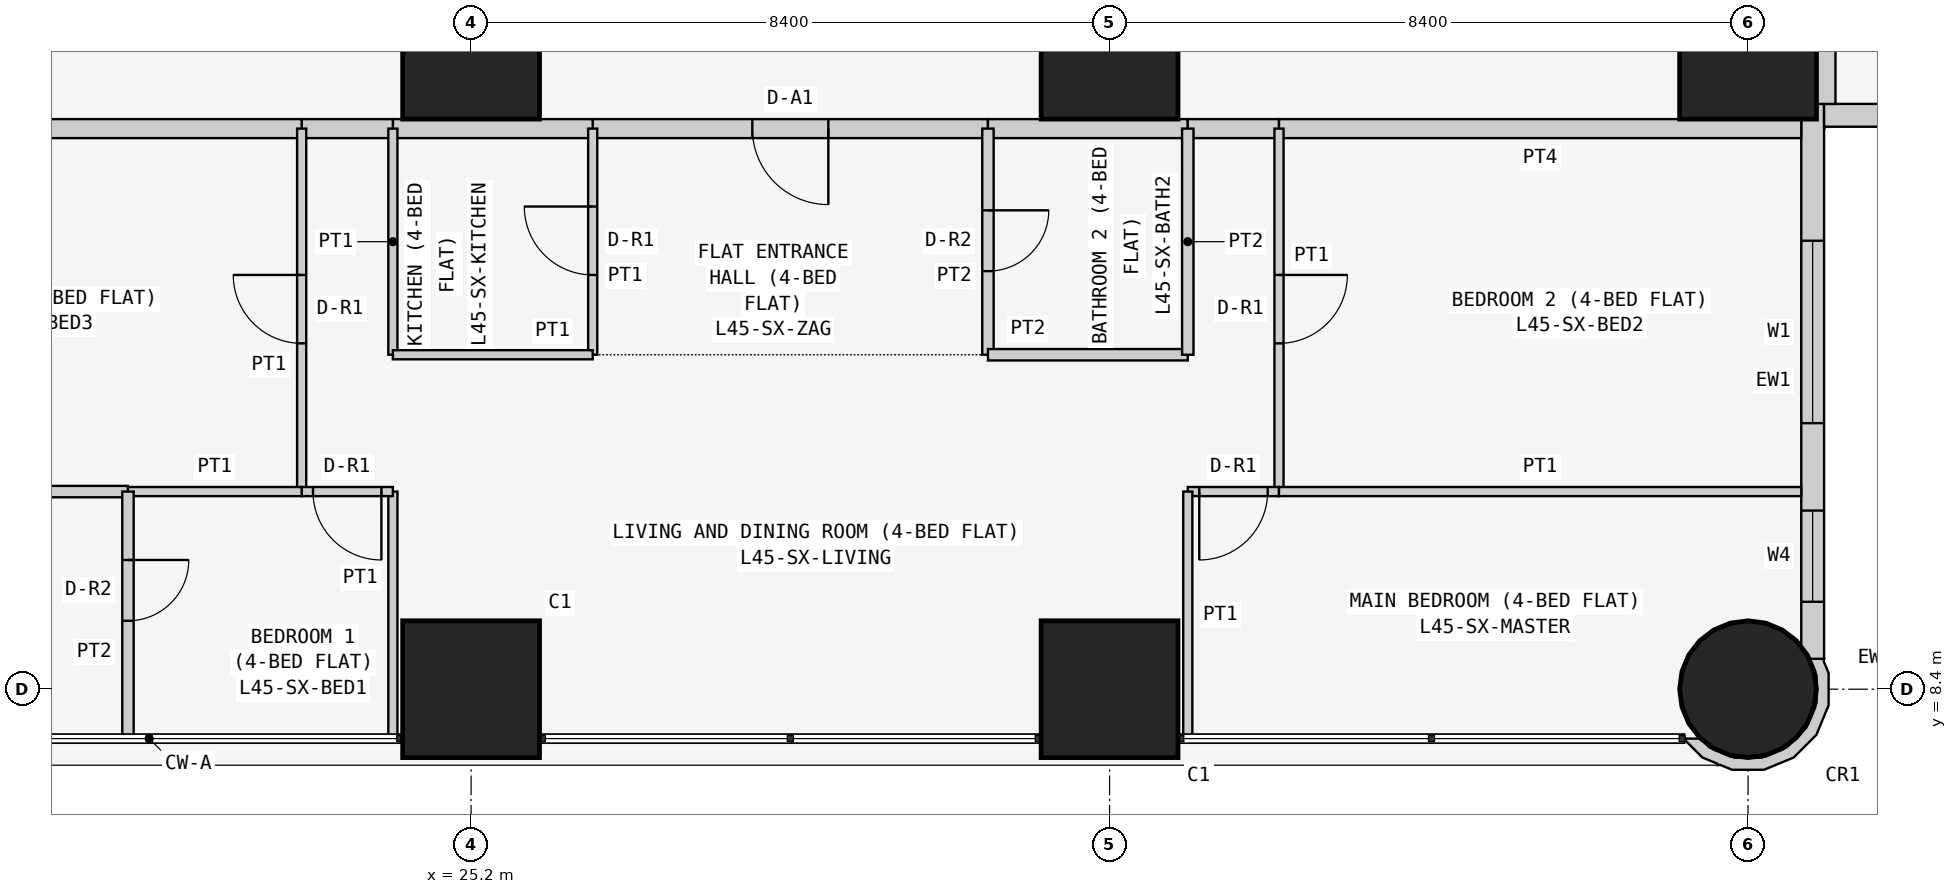
"""IFC4 building model, lengths in metres.
Left out: names, types, materials, properties, quantities, classifications, styles, units other than length and angle.
Written with IfcOpenShell. Run it as: python <this file> out.ifc"""

import sys

from ifc_helpers import new_model, si_unit, direction, frame, frame_2d, origin, origin_2d, place, context, subcontext, project, spatial, polyline, rectangle, circle, outline, extrude, element, fill, save


model = new_model("IFC4")
c1 = context("Model", 3, precision=1e-05, world=origin(), true_north=direction((0.0, 1.0)))
c2 = subcontext(c1, "Body", "Model", "MODEL_VIEW")
j1 = project(units=[si_unit("LENGTHUNIT", "METRE"), si_unit("PLANEANGLEUNIT", "RADIAN")], contexts=[c1])
p1 = place(None, origin())
s1 = spatial("IfcSite", under=j1, at=p1, CompositionType="ELEMENT")
p2 = place(p1, origin())
s2 = spatial("IfcBuilding", under=s1, at=p2, CompositionType="ELEMENT")
p3 = place(p2, frame((0.0, 0.0, 173.7)))
s3 = spatial("IfcBuildingStorey", under=s2, at=p3, CompositionType="ELEMENT", Elevation=173.7)
for number, where, z_axis, x_axis in (
    (1, (25.2, 8.4, 0.0), (0.0, 0.0, 1.0), (1.0, 0.0, 0.0)),
    (2, (25.2, 16.8, 0.0), (0.0, 0.0, 1.0), (1.0, 0.0, 0.0)),
    (3, (33.6, 8.4, 0.0), (0.0, 0.0, 1.0), (1.0, 0.0, 0.0)),
    (4, (33.6, 16.8, 0.0), (0.0, 0.0, 1.0), (1.0, 0.0, 0.0)),
):
    element("IfcColumn", number, at=place(p3, frame(where, z_axis=z_axis, x_axis=x_axis)), inside=s3, PredefinedType="COLUMN", context=c2, shape_type="SweptSolid", body=[
        extrude(rectangle(XDim=1.8, YDim=1.8, at=origin_2d()), origin(), (0.0, 0.0, 1.0), 3.6),
    ])
p4 = place(p3, frame((42.0, 8.4, 0.0), z_axis=(0.0, 0.0, 1.0), x_axis=(1.0, 0.0, 0.0)))
e5 = element("IfcColumn", 5, at=p4, inside=s3, PredefinedType="COLUMN", context=c2, shape_type="SweptSolid", body=[
    extrude(circle(Radius=0.9, at=origin_2d()), origin(), (0.0, 0.0, 1.0), 3.6),
])
p5 = place(p3, frame((42.0, 16.8, 0.0), z_axis=(0.0, 0.0, 1.0), x_axis=(1.0, 0.0, 0.0)))
e6 = element("IfcColumn", 6, at=p5, inside=s3, PredefinedType="COLUMN", context=c2, shape_type="SweptSolid", body=[
    extrude(rectangle(XDim=1.8, YDim=1.8, at=origin_2d()), origin(), (0.0, 0.0, 1.0), 3.6),
])
p6 = place(p3, frame((42.85, 8.8, 0.0), z_axis=(0.0, 0.0, 1.0), x_axis=(0.0, 1.0, 0.0)))
e7 = element("IfcWall", 7, at=p6, inside=s3, PredefinedType="SOLIDWALL", context=c2, shape_type="SweptSolid", body=[
    extrude(rectangle(XDim=7.3, YDim=0.3, at=frame_2d((3.65, 0.0))), origin(), (0.0, 0.0, 1.0), 3.35),
])
p7 = place(p6, frame((3.1, 0.0, 0.9)))
e8 = element("IfcOpeningElement", 8, at=p7, cuts=e7, PredefinedType="OPENING", context=c2, shape_type="SweptSolid", body=[
    extrude(rectangle(XDim=2.4, YDim=1.5, at=frame_2d((1.2, 0.75))), frame((0.0, 0.16, 0.0), z_axis=(0.0, -1.0, 0.0), x_axis=(1.0, 0.0, 0.0)), (0.0, 0.0, 1.0), 0.32),
])
p8 = place(p6, frame((0.75, 0.0, 0.9)))
e9 = element("IfcOpeningElement", 9, at=p8, cuts=e7, PredefinedType="OPENING", context=c2, shape_type="SweptSolid", body=[
    extrude(rectangle(XDim=1.2, YDim=1.5, at=frame_2d((0.6, 0.75))), frame((0.0, 0.16, 0.0), z_axis=(0.0, -1.0, 0.0), x_axis=(1.0, 0.0, 0.0)), (0.0, 0.0, 1.0), 0.32),
])
p9 = place(p3, frame((43.0, 15.95, 0.0), z_axis=(0.0, 0.0, 1.0), x_axis=(1.0, 0.0, 0.0)))
e10 = element("IfcWall", 10, at=p9, inside=s3, PredefinedType="SOLIDWALL", context=c2, shape_type="SweptSolid", body=[
    extrude(rectangle(XDim=15.4, YDim=0.3, at=frame_2d((7.7, 0.0))), origin(), (0.0, 0.0, 1.0), 3.35),
])
p10 = place(p9, frame((1.2, 0.0, 0.9)))
e11 = element("IfcOpeningElement", 11, at=p10, cuts=e10, PredefinedType="OPENING", context=c2, shape_type="SweptSolid", body=[
    extrude(rectangle(XDim=1.8, YDim=1.5, at=frame_2d((0.9, 0.75))), frame((0.0, 0.16, 0.0), z_axis=(0.0, -1.0, 0.0), x_axis=(1.0, 0.0, 0.0)), (0.0, 0.0, 1.0), 0.32),
])
p11 = place(p9, frame((4.95, 0.0, 1.5)))
e12 = element("IfcOpeningElement", 12, at=p11, cuts=e10, PredefinedType="OPENING", context=c2, shape_type="SweptSolid", body=[
    extrude(rectangle(XDim=0.9, YDim=0.7, at=frame_2d((0.45, 0.35))), frame((0.0, 0.16, 0.0), z_axis=(0.0, -1.0, 0.0), x_axis=(1.0, 0.0, 0.0)), (0.0, 0.0, 1.0), 0.32),
])
p12 = place(p9, frame((8.5, 0.0, 0.9)))
e13 = element("IfcOpeningElement", 13, at=p12, cuts=e10, PredefinedType="OPENING", context=c2, shape_type="SweptSolid", body=[
    extrude(rectangle(XDim=1.8, YDim=1.5, at=frame_2d((0.9, 0.75))), frame((0.0, 0.16, 0.0), z_axis=(0.0, -1.0, 0.0), x_axis=(1.0, 0.0, 0.0)), (0.0, 0.0, 1.0), 0.32),
])
p13 = place(p9, frame((12.5, 0.0, 0.0)))
e14 = element("IfcOpeningElement", 14, at=p13, cuts=e10, PredefinedType="OPENING", context=c2, shape_type="SweptSolid", body=[
    extrude(rectangle(XDim=0.9, YDim=2.4, at=frame_2d((0.45, 1.2))), frame((0.0, 0.16, 0.0), z_axis=(0.0, -1.0, 0.0), x_axis=(1.0, 0.0, 0.0)), (0.0, 0.0, 1.0), 0.32),
])
p14 = place(p9, frame((13.5, 0.0, 0.9)))
e15 = element("IfcOpeningElement", 15, at=p14, cuts=e10, PredefinedType="OPENING", context=c2, shape_type="SweptSolid", body=[
    extrude(rectangle(XDim=1.2, YDim=1.5, at=frame_2d((0.6, 0.75))), frame((0.0, 0.16, 0.0), z_axis=(0.0, -1.0, 0.0), x_axis=(1.0, 0.0, 0.0)), (0.0, 0.0, 1.0), 0.32),
])
p15 = place(p3, frame((41.233, 7.789, 0.0), z_axis=(0.0, 0.0, 1.0), x_axis=(0.377204953059, -0.926129809145, 0.0)))
e16 = element("IfcWall", 16, at=p15, inside=s3, PredefinedType="SOLIDWALL", context=c2, shape_type="SweptSolid", body=[
    extrude(outline(polyline([(0.319, 1.842), (-0.072, 2.002), (-0.24, 2.001), (-0.27, 2.017), (-0.37, 1.841), (-0.102, 1.842), (0.23, 1.707), (0.485, 1.455), (0.624, 1.125), (0.626, 0.766), (0.491, 0.434), (0.239, 0.179), (0.09, 0.117), (0.011, -0.078), (0.025, -0.083), (0.329, 0.045), (0.48, 0.198), (0.499, 0.193), (0.508, 0.225), (0.626, 0.345), (0.785, 0.736), (0.782, 1.157), (0.619, 1.546), (0.319, 1.842)])), origin(), (0.0, 0.0, 1.0), 3.35),
])
p16 = place(p3, frame((43.025, 22.571, 0.0), z_axis=(0.0, 0.0, 1.0), x_axis=(0.0, -1.0, 0.0)))
e17 = element("IfcWall", 17, at=p16, inside=s3, PredefinedType="PARTITIONING", context=c2, shape_type="SweptSolid", body=[
    extrude(rectangle(XDim=6.471, YDim=0.25, at=frame_2d((3.235, 0.0))), origin(), (0.0, 0.0, 1.0), 3.35),
])
p17 = place(p3, frame((32.0, 15.775, 0.0), z_axis=(0.0, 0.0, 1.0), x_axis=(-1.0, 0.0, 0.0)))
e18 = element("IfcWall", 18, at=p17, inside=s3, PredefinedType="PARTITIONING", context=c2, shape_type="SweptSolid", body=[
    extrude(rectangle(XDim=5.2, YDim=0.25, at=frame_2d((2.6, 0.0))), origin(), (0.0, 0.0, 1.0), 3.35),
])
p18 = place(p17, frame((2.1, 0.0, 0.0)))
e19 = element("IfcOpeningElement", 19, at=p18, cuts=e18, PredefinedType="OPENING", context=c2, shape_type="SweptSolid", body=[
    extrude(rectangle(XDim=1.0, YDim=2.1, at=frame_2d((0.5, 1.05))), frame((0.0, 0.135, 0.0), z_axis=(0.0, -1.0, 0.0), x_axis=(1.0, 0.0, 0.0)), (0.0, 0.0, 1.0), 0.27),
])
p19 = place(p3, frame((34.629, 15.775, 0.0), z_axis=(0.0, 0.0, 1.0), x_axis=(-1.0, 0.0, 0.0)))
e20 = element("IfcWall", 20, at=p19, inside=s3, PredefinedType="PARTITIONING", context=c2, shape_type="SweptSolid", body=[
    extrude(rectangle(XDim=2.629, YDim=0.25, at=frame_2d((1.314, 0.0))), origin(), (0.0, 0.0, 1.0), 3.35),
])
p20 = place(p3, frame((26.8, 15.775, 0.0), z_axis=(0.0, 0.0, 1.0), x_axis=(-1.0, 0.0, 0.0)))
e21 = element("IfcWall", 21, at=p20, inside=s3, PredefinedType="PARTITIONING", context=c2, shape_type="SweptSolid", body=[
    extrude(rectangle(XDim=2.629, YDim=0.25, at=frame_2d((1.314, 0.0))), origin(), (0.0, 0.0, 1.0), 3.35),
])
p21 = place(p3, frame((24.171, 15.775, 0.0), z_axis=(0.0, 0.0, 1.0), x_axis=(-1.0, 0.0, 0.0)))
e22 = element("IfcWall", 22, at=p21, inside=s3, PredefinedType="PARTITIONING", context=c2, shape_type="SweptSolid", body=[
    extrude(rectangle(XDim=1.2, YDim=0.25, at=frame_2d((0.6, 0.0))), origin(), (0.0, 0.0, 1.0), 3.35),
])
p22 = place(p3, frame((35.829, 15.775, 0.0), z_axis=(0.0, 0.0, 1.0), x_axis=(-1.0, 0.0, 0.0)))
e23 = element("IfcWall", 23, at=p22, inside=s3, PredefinedType="PARTITIONING", context=c2, shape_type="SweptSolid", body=[
    extrude(rectangle(XDim=1.2, YDim=0.25, at=frame_2d((0.6, 0.0))), origin(), (0.0, 0.0, 1.0), 3.35),
])
for number, where, z_axis, x_axis in (
    (24, (42.7, 15.775, 0.0), (0.0, 0.0, 1.0), (-1.0, 0.0, 0.0)),
    (25, (22.971, 15.775, 0.0), (0.0, 0.0, 1.0), (-1.0, 0.0, 0.0)),
):
    element("IfcWall", number, at=place(p3, frame(where, z_axis=z_axis, x_axis=x_axis)), inside=s3, PredefinedType="PARTITIONING", context=c2, shape_type="SweptSolid", body=[
        extrude(rectangle(XDim=6.871, YDim=0.25, at=frame_2d((3.436, 0.0))), origin(), (0.0, 0.0, 1.0), 3.35),
    ])
p23 = place(p3, frame((32.0, 12.8, 0.0), z_axis=(0.0, 0.0, 1.0), x_axis=(0.0, 1.0, 0.0)))
e26 = element("IfcWall", 26, at=p23, inside=s3, PredefinedType="PARTITIONING", context=c2, shape_type="SweptSolid", body=[
    extrude(rectangle(XDim=2.975, YDim=0.15, at=frame_2d((1.487, 0.0))), origin(), (0.0, 0.0, 1.0), 3.35),
])
p24 = place(p23, frame((1.1, 0.0, 0.0)))
e27 = element("IfcOpeningElement", 27, at=p24, cuts=e26, PredefinedType="OPENING", context=c2, shape_type="SweptSolid", body=[
    extrude(rectangle(XDim=0.8, YDim=2.1, at=frame_2d((0.4, 1.05))), frame((0.0, 0.085, 0.0), z_axis=(0.0, -1.0, 0.0), x_axis=(1.0, 0.0, 0.0)), (0.0, 0.0, 1.0), 0.17),
])
p25 = place(p3, frame((26.8, 15.775, 0.0), z_axis=(0.0, 0.0, 1.0), x_axis=(0.0, -1.0, 0.0)))
e28 = element("IfcWall", 28, at=p25, inside=s3, PredefinedType="PARTITIONING", context=c2, shape_type="SweptSolid", body=[
    extrude(rectangle(XDim=2.975, YDim=0.12, at=frame_2d((1.487, 0.0))), origin(), (0.0, 0.0, 1.0), 3.35),
])
p26 = place(p25, frame((1.025, 0.0, 0.0)))
e29 = element("IfcOpeningElement", 29, at=p26, cuts=e28, PredefinedType="OPENING", context=c2, shape_type="SweptSolid", body=[
    extrude(rectangle(XDim=0.9, YDim=2.1, at=frame_2d((0.45, 1.05))), frame((0.0, 0.07, 0.0), z_axis=(0.0, -1.0, 0.0), x_axis=(1.0, 0.0, 0.0)), (0.0, 0.0, 1.0), 0.14),
])
p27 = place(p3, frame((32.0, 12.8, 0.0), z_axis=(0.0, 0.0, 1.0), x_axis=(1.0, 0.0, 0.0)))
e30 = element("IfcWall", 30, at=p27, inside=s3, PredefinedType="PARTITIONING", context=c2, shape_type="SweptSolid", body=[
    extrude(rectangle(XDim=2.629, YDim=0.15, at=frame_2d((1.314, 0.0))), origin(), (0.0, 0.0, 1.0), 3.35),
])
p28 = place(p3, frame((34.629, 12.8, 0.0), z_axis=(0.0, 0.0, 1.0), x_axis=(0.0, 1.0, 0.0)))
e31 = element("IfcWall", 31, at=p28, inside=s3, PredefinedType="PARTITIONING", context=c2, shape_type="SweptSolid", body=[
    extrude(rectangle(XDim=2.975, YDim=0.15, at=frame_2d((1.487, 0.0))), origin(), (0.0, 0.0, 1.0), 3.35),
])
p29 = place(p3, frame((24.171, 15.775, 0.0), z_axis=(0.0, 0.0, 1.0), x_axis=(0.0, -1.0, 0.0)))
e32 = element("IfcWall", 32, at=p29, inside=s3, PredefinedType="PARTITIONING", context=c2, shape_type="SweptSolid", body=[
    extrude(rectangle(XDim=2.975, YDim=0.12, at=frame_2d((1.487, 0.0))), origin(), (0.0, 0.0, 1.0), 3.35),
])
p30 = place(p3, frame((24.171, 12.8, 0.0), z_axis=(0.0, 0.0, 1.0), x_axis=(1.0, 0.0, 0.0)))
e33 = element("IfcWall", 33, at=p30, inside=s3, PredefinedType="PARTITIONING", context=c2, shape_type="SweptSolid", body=[
    extrude(rectangle(XDim=2.629, YDim=0.12, at=frame_2d((1.314, 0.0))), origin(), (0.0, 0.0, 1.0), 3.35),
])
p31 = place(p3, frame((35.829, 15.775, 0.0), z_axis=(0.0, 0.0, 1.0), x_axis=(0.0, -1.0, 0.0)))
e34 = element("IfcWall", 34, at=p31, inside=s3, PredefinedType="PARTITIONING", context=c2, shape_type="SweptSolid", body=[
    extrude(rectangle(XDim=4.775, YDim=0.12, at=frame_2d((2.387, 0.0))), origin(), (0.0, 0.0, 1.0), 3.35),
])
p32 = place(p31, frame((1.925, 0.0, 0.0)))
e35 = element("IfcOpeningElement", 35, at=p32, cuts=e34, PredefinedType="OPENING", context=c2, shape_type="SweptSolid", body=[
    extrude(rectangle(XDim=0.9, YDim=2.1, at=frame_2d((0.45, 1.05))), frame((0.0, 0.07, 0.0), z_axis=(0.0, -1.0, 0.0), x_axis=(1.0, 0.0, 0.0)), (0.0, 0.0, 1.0), 0.14),
])
p33 = place(p3, frame((35.829, 11.0, 0.0), z_axis=(0.0, 0.0, 1.0), x_axis=(-1.0, 0.0, 0.0)))
e36 = element("IfcWall", 36, at=p33, inside=s3, PredefinedType="PARTITIONING", context=c2, shape_type="SweptSolid", body=[
    extrude(rectangle(XDim=1.2, YDim=0.12, at=frame_2d((0.6, 0.0))), origin(), (0.0, 0.0, 1.0), 3.35),
])
p34 = place(p33, frame((0.149, 0.0, 0.0)))
e37 = element("IfcOpeningElement", 37, at=p34, cuts=e36, PredefinedType="OPENING", context=c2, shape_type="SweptSolid", body=[
    extrude(rectangle(XDim=0.9, YDim=2.1, at=frame_2d((0.45, 1.05))), frame((0.0, 0.07, 0.0), z_axis=(0.0, -1.0, 0.0), x_axis=(1.0, 0.0, 0.0)), (0.0, 0.0, 1.0), 0.14),
])
p35 = place(p3, frame((34.629, 11.0, 0.0), z_axis=(0.0, 0.0, 1.0), x_axis=(0.0, -1.0, 0.0)))
e38 = element("IfcWall", 38, at=p35, inside=s3, PredefinedType="PARTITIONING", context=c2, shape_type="SweptSolid", body=[
    extrude(rectangle(XDim=3.25, YDim=0.12, at=frame_2d((1.625, 0.0))), origin(), (0.0, 0.0, 1.0), 3.35),
])
p36 = place(p3, frame((22.971, 11.0, 0.0), z_axis=(0.0, 0.0, 1.0), x_axis=(0.0, 1.0, 0.0)))
e39 = element("IfcWall", 39, at=p36, inside=s3, PredefinedType="PARTITIONING", context=c2, shape_type="SweptSolid", body=[
    extrude(rectangle(XDim=4.775, YDim=0.12, at=frame_2d((2.387, 0.0))), origin(), (0.0, 0.0, 1.0), 3.35),
])
p37 = place(p36, frame((1.95, 0.0, 0.0)))
e40 = element("IfcOpeningElement", 40, at=p37, cuts=e39, PredefinedType="OPENING", context=c2, shape_type="SweptSolid", body=[
    extrude(rectangle(XDim=0.9, YDim=2.1, at=frame_2d((0.45, 1.05))), frame((0.0, 0.07, 0.0), z_axis=(0.0, -1.0, 0.0), x_axis=(1.0, 0.0, 0.0)), (0.0, 0.0, 1.0), 0.14),
])
p38 = place(p3, frame((24.171, 7.75, 0.0), z_axis=(0.0, 0.0, 1.0), x_axis=(0.0, 1.0, 0.0)))
e41 = element("IfcWall", 41, at=p38, inside=s3, PredefinedType="PARTITIONING", context=c2, shape_type="SweptSolid", body=[
    extrude(rectangle(XDim=3.25, YDim=0.12, at=frame_2d((1.625, 0.0))), origin(), (0.0, 0.0, 1.0), 3.35),
])
p39 = place(p3, frame((24.171, 11.0, 0.0), z_axis=(0.0, 0.0, 1.0), x_axis=(-1.0, 0.0, 0.0)))
e42 = element("IfcWall", 42, at=p39, inside=s3, PredefinedType="PARTITIONING", context=c2, shape_type="SweptSolid", body=[
    extrude(rectangle(XDim=1.2, YDim=0.12, at=frame_2d((0.6, 0.0))), origin(), (0.0, 0.0, 1.0), 3.35),
])
p40 = place(p39, frame((0.151, 0.0, 0.0)))
e43 = element("IfcOpeningElement", 43, at=p40, cuts=e42, PredefinedType="OPENING", context=c2, shape_type="SweptSolid", body=[
    extrude(rectangle(XDim=0.9, YDim=2.1, at=frame_2d((0.45, 1.05))), frame((0.0, 0.07, 0.0), z_axis=(0.0, -1.0, 0.0), x_axis=(1.0, 0.0, 0.0)), (0.0, 0.0, 1.0), 0.14),
])
p41 = place(p3, frame((35.829, 11.0, 0.0), z_axis=(0.0, 0.0, 1.0), x_axis=(1.0, 0.0, 0.0)))
e44 = element("IfcWall", 44, at=p41, inside=s3, PredefinedType="PARTITIONING", context=c2, shape_type="SweptSolid", body=[
    extrude(rectangle(XDim=6.871, YDim=0.12, at=frame_2d((3.436, 0.0))), origin(), (0.0, 0.0, 1.0), 3.35),
])
p42 = place(p3, frame((16.1, 11.0, 0.0), z_axis=(0.0, 0.0, 1.0), x_axis=(1.0, 0.0, 0.0)))
e45 = element("IfcWall", 45, at=p42, inside=s3, PredefinedType="PARTITIONING", context=c2, shape_type="SweptSolid", body=[
    extrude(rectangle(XDim=4.586, YDim=0.15, at=frame_2d((2.293, 0.0))), origin(), (0.0, 0.0, 1.0), 3.35),
])
p43 = place(p3, frame((20.686, 11.0, 0.0), z_axis=(0.0, 0.0, 1.0), x_axis=(1.0, 0.0, 0.0)))
e46 = element("IfcWall", 46, at=p43, inside=s3, PredefinedType="PARTITIONING", context=c2, shape_type="SweptSolid", body=[
    extrude(rectangle(XDim=2.285, YDim=0.12, at=frame_2d((1.143, 0.0))), origin(), (0.0, 0.0, 1.0), 3.35),
])
p44 = place(p3, frame((20.686, 7.75, 0.0), z_axis=(0.0, 0.0, 1.0), x_axis=(0.0, 1.0, 0.0)))
e47 = element("IfcWall", 47, at=p44, inside=s3, PredefinedType="PARTITIONING", context=c2, shape_type="SweptSolid", body=[
    extrude(rectangle(XDim=3.25, YDim=0.15, at=frame_2d((1.625, 0.0))), origin(), (0.0, 0.0, 1.0), 3.35),
])
p45 = place(p44, frame((1.55, 0.0, 0.0)))
e48 = element("IfcOpeningElement", 48, at=p45, cuts=e47, PredefinedType="OPENING", context=c2, shape_type="SweptSolid", body=[
    extrude(rectangle(XDim=0.8, YDim=2.1, at=frame_2d((0.4, 1.05))), frame((0.0, 0.085, 0.0), z_axis=(0.0, -1.0, 0.0), x_axis=(1.0, 0.0, 0.0)), (0.0, 0.0, 1.0), 0.17),
])
p46 = place(p7, origin())
e49 = element("IfcWindow", 49, at=p46, inside=s3, PartitioningType="SINGLE_PANEL", PredefinedType="WINDOW", context=c2, shape_type="SweptSolid", body=[
    extrude(rectangle(XDim=2.4, YDim=1.5, at=frame_2d((1.2, 0.75))), frame((0.0, 0.03, 0.0), z_axis=(0.0, -1.0, 0.0), x_axis=(1.0, 0.0, 0.0)), (0.0, 0.0, 1.0), 0.06),
])
fill(e8, e49)
p47 = place(p8, origin())
e50 = element("IfcWindow", 50, at=p47, inside=s3, PartitioningType="SINGLE_PANEL", PredefinedType="WINDOW", context=c2, shape_type="SweptSolid", body=[
    extrude(rectangle(XDim=1.2, YDim=1.5, at=frame_2d((0.6, 0.75))), frame((0.0, 0.03, 0.0), z_axis=(0.0, -1.0, 0.0), x_axis=(1.0, 0.0, 0.0)), (0.0, 0.0, 1.0), 0.06),
])
fill(e9, e50)
p48 = place(p18, origin())
e51 = element("IfcDoor", 51, at=p48, inside=s3, OperationType="SINGLE_SWING_LEFT", PredefinedType="DOOR", context=c2, shape_type="SweptSolid", body=[
    extrude(rectangle(XDim=1.0, YDim=2.1, at=frame_2d((0.5, 1.05))), frame((0.0, 0.025, 0.0), z_axis=(0.0, -1.0, 0.0), x_axis=(1.0, 0.0, 0.0)), (0.0, 0.0, 1.0), 0.05),
])
fill(e19, e51)
p49 = place(p24, frame((0.8, 0.0, 0.0), z_axis=(0.0, 0.0, 1.0), x_axis=(-1.0, 0.0, 0.0)))
e52 = element("IfcDoor", 52, at=p49, inside=s3, OperationType="SINGLE_SWING_LEFT", PredefinedType="DOOR", context=c2, shape_type="SweptSolid", body=[
    extrude(rectangle(XDim=0.8, YDim=2.1, at=frame_2d((0.4, 1.05))), frame((0.0, 0.025, 0.0), z_axis=(0.0, -1.0, 0.0), x_axis=(1.0, 0.0, 0.0)), (0.0, 0.0, 1.0), 0.05),
])
fill(e27, e52)
p50 = place(p26, frame((0.9, 0.0, 0.0), z_axis=(0.0, 0.0, 1.0), x_axis=(-1.0, 0.0, 0.0)))
e53 = element("IfcDoor", 53, at=p50, inside=s3, OperationType="SINGLE_SWING_RIGHT", PredefinedType="DOOR", context=c2, shape_type="SweptSolid", body=[
    extrude(rectangle(XDim=0.9, YDim=2.1, at=frame_2d((0.45, 1.05))), frame((0.0, 0.025, 0.0), z_axis=(0.0, -1.0, 0.0), x_axis=(1.0, 0.0, 0.0)), (0.0, 0.0, 1.0), 0.05),
])
fill(e29, e53)
p51 = place(p32, origin())
e54 = element("IfcDoor", 54, at=p51, inside=s3, OperationType="SINGLE_SWING_LEFT", PredefinedType="DOOR", context=c2, shape_type="SweptSolid", body=[
    extrude(rectangle(XDim=0.9, YDim=2.1, at=frame_2d((0.45, 1.05))), frame((0.0, 0.025, 0.0), z_axis=(0.0, -1.0, 0.0), x_axis=(1.0, 0.0, 0.0)), (0.0, 0.0, 1.0), 0.05),
])
fill(e35, e54)
p52 = place(p34, origin())
e55 = element("IfcDoor", 55, at=p52, inside=s3, OperationType="SINGLE_SWING_RIGHT", PredefinedType="DOOR", context=c2, shape_type="SweptSolid", body=[
    extrude(rectangle(XDim=0.9, YDim=2.1, at=frame_2d((0.45, 1.05))), frame((0.0, 0.025, 0.0), z_axis=(0.0, -1.0, 0.0), x_axis=(1.0, 0.0, 0.0)), (0.0, 0.0, 1.0), 0.05),
])
fill(e37, e55)
p53 = place(p37, origin())
e56 = element("IfcDoor", 56, at=p53, inside=s3, OperationType="SINGLE_SWING_RIGHT", PredefinedType="DOOR", context=c2, shape_type="SweptSolid", body=[
    extrude(rectangle(XDim=0.9, YDim=2.1, at=frame_2d((0.45, 1.05))), frame((0.0, 0.025, 0.0), z_axis=(0.0, -1.0, 0.0), x_axis=(1.0, 0.0, 0.0)), (0.0, 0.0, 1.0), 0.05),
])
fill(e40, e56)
p54 = place(p40, origin())
e57 = element("IfcDoor", 57, at=p54, inside=s3, OperationType="SINGLE_SWING_LEFT", PredefinedType="DOOR", context=c2, shape_type="SweptSolid", body=[
    extrude(rectangle(XDim=0.9, YDim=2.1, at=frame_2d((0.45, 1.05))), frame((0.0, 0.025, 0.0), z_axis=(0.0, -1.0, 0.0), x_axis=(1.0, 0.0, 0.0)), (0.0, 0.0, 1.0), 0.05),
])
fill(e43, e57)
p55 = place(p45, frame((0.8, 0.0, 0.0), z_axis=(0.0, 0.0, 1.0), x_axis=(-1.0, 0.0, 0.0)))
e58 = element("IfcDoor", 58, at=p55, inside=s3, OperationType="SINGLE_SWING_LEFT", PredefinedType="DOOR", context=c2, shape_type="SweptSolid", body=[
    extrude(rectangle(XDim=0.8, YDim=2.1, at=frame_2d((0.4, 1.05))), frame((0.0, 0.025, 0.0), z_axis=(0.0, -1.0, 0.0), x_axis=(1.0, 0.0, 0.0)), (0.0, 0.0, 1.0), 0.05),
])
fill(e48, e58)
save(model, sys.argv[1])
